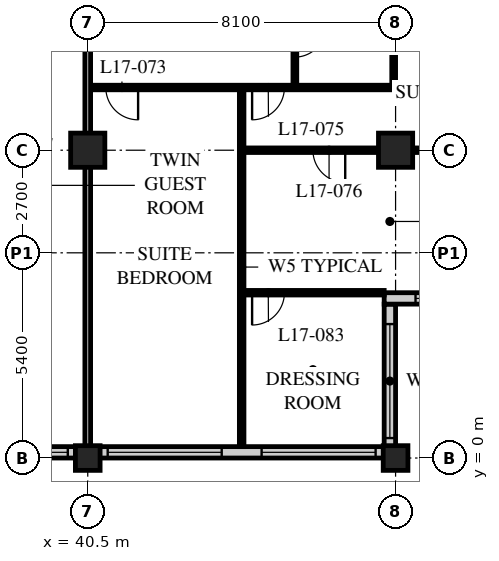
"""IFC4 building model, lengths in metres.
Left out: names, types, materials, properties, quantities, classifications, styles, units other than length and angle.
Written with IfcOpenShell. Run it as: python <this file> out.ifc"""

import sys

from ifc_helpers import new_model, si_unit, direction, frame, frame_2d, origin, origin_2d, place, context, subcontext, project, spatial, rectangle, hollow_rectangle, extrude, element, fill, save


model = new_model("IFC4")
c1 = context("Model", 3, precision=1e-05, world=origin(), true_north=direction((0.0, 1.0)))
c2 = subcontext(c1, "Body", "Model", "MODEL_VIEW")
j1 = project(units=[si_unit("LENGTHUNIT", "METRE"), si_unit("PLANEANGLEUNIT", "RADIAN")], contexts=[c1])
p1 = place(None, origin())
s1 = spatial("IfcSite", under=j1, at=p1, CompositionType="ELEMENT")
p2 = place(p1, origin())
s2 = spatial("IfcBuilding", under=s1, at=p2, CompositionType="ELEMENT")
p3 = place(p2, frame((0.0, 0.0, 70.4)))
s3 = spatial("IfcBuildingStorey", under=s2, at=p3, CompositionType="ELEMENT", Elevation=70.4)
p4 = place(p3, frame((40.5, 0.0, 0.0), z_axis=(0.0, 0.0, 1.0), x_axis=(1.0, 0.0, 0.0)))
e1 = element("IfcColumn", 1, at=p4, inside=s3, PredefinedType="COLUMN", context=c2, shape_type="SweptSolid", body=[
    extrude(hollow_rectangle(XDim=0.65, YDim=0.65, WallThickness=0.05, at=origin_2d()), origin(), (0.0, 0.0, 1.0), 3.4),
])
p5 = place(p3, frame((40.5, 8.1, 0.0), z_axis=(0.0, 0.0, 1.0), x_axis=(1.0, 0.0, 0.0)))
e2 = element("IfcColumn", 2, at=p5, inside=s3, PredefinedType="COLUMN", context=c2, shape_type="SweptSolid", body=[
    extrude(hollow_rectangle(XDim=0.9, YDim=0.9, WallThickness=0.09, at=origin_2d()), origin(), (0.0, 0.0, 1.0), 3.4),
])
p6 = place(p3, frame((48.6, 0.0, 0.0), z_axis=(0.0, 0.0, 1.0), x_axis=(1.0, 0.0, 0.0)))
e3 = element("IfcColumn", 3, at=p6, inside=s3, PredefinedType="COLUMN", context=c2, shape_type="SweptSolid", body=[
    extrude(hollow_rectangle(XDim=0.65, YDim=0.65, WallThickness=0.05, at=origin_2d()), origin(), (0.0, 0.0, 1.0), 3.4),
])
p7 = place(p3, frame((48.6, 8.1, 0.0), z_axis=(0.0, 0.0, 1.0), x_axis=(1.0, 0.0, 0.0)))
e4 = element("IfcColumn", 4, at=p7, inside=s3, PredefinedType="COLUMN", context=c2, shape_type="SweptSolid", body=[
    extrude(hollow_rectangle(XDim=0.9, YDim=0.9, WallThickness=0.09, at=origin_2d()), origin(), (0.0, 0.0, 1.0), 3.4),
])
p8 = place(p3, frame((8.4, 0.15, 0.0), z_axis=(0.0, 0.0, 1.0), x_axis=(1.0, 0.0, 0.0)))
e5 = element("IfcWall", 5, at=p8, inside=s3, PredefinedType="SOLIDWALL", context=c2, shape_type="SweptSolid", body=[
    extrude(rectangle(XDim=40.2, YDim=0.3, at=frame_2d((20.1, 0.0))), origin(), (0.0, 0.0, 1.0), 3.19),
])
p9 = place(p8, frame((0.225, 0.0, 0.9)))
e6 = element("IfcOpeningElement", 6, at=p9, cuts=e5, PredefinedType="OPENING", context=c2, shape_type="SweptSolid", body=[
    extrude(rectangle(XDim=3.0, YDim=2.0, at=frame_2d((1.5, 1.0))), frame((0.0, 0.16, 0.0), z_axis=(0.0, -1.0, 0.0), x_axis=(1.0, 0.0, 0.0)), (0.0, 0.0, 1.0), 0.32),
])
p10 = place(p8, frame((4.275, 0.0, 0.9)))
e7 = element("IfcOpeningElement", 7, at=p10, cuts=e5, PredefinedType="OPENING", context=c2, shape_type="SweptSolid", body=[
    extrude(rectangle(XDim=3.0, YDim=2.0, at=frame_2d((1.5, 1.0))), frame((0.0, 0.16, 0.0), z_axis=(0.0, -1.0, 0.0), x_axis=(1.0, 0.0, 0.0)), (0.0, 0.0, 1.0), 0.32),
])
p11 = place(p8, frame((8.325, 0.0, 0.9)))
e8 = element("IfcOpeningElement", 8, at=p11, cuts=e5, PredefinedType="OPENING", context=c2, shape_type="SweptSolid", body=[
    extrude(rectangle(XDim=3.0, YDim=2.0, at=frame_2d((1.5, 1.0))), frame((0.0, 0.16, 0.0), z_axis=(0.0, -1.0, 0.0), x_axis=(1.0, 0.0, 0.0)), (0.0, 0.0, 1.0), 0.32),
])
p12 = place(p8, frame((12.375, 0.0, 0.9)))
e9 = element("IfcOpeningElement", 9, at=p12, cuts=e5, PredefinedType="OPENING", context=c2, shape_type="SweptSolid", body=[
    extrude(rectangle(XDim=3.0, YDim=2.0, at=frame_2d((1.5, 1.0))), frame((0.0, 0.16, 0.0), z_axis=(0.0, -1.0, 0.0), x_axis=(1.0, 0.0, 0.0)), (0.0, 0.0, 1.0), 0.32),
])
p13 = place(p8, frame((16.425, 0.0, 0.9)))
e10 = element("IfcOpeningElement", 10, at=p13, cuts=e5, PredefinedType="OPENING", context=c2, shape_type="SweptSolid", body=[
    extrude(rectangle(XDim=3.0, YDim=2.0, at=frame_2d((1.5, 1.0))), frame((0.0, 0.16, 0.0), z_axis=(0.0, -1.0, 0.0), x_axis=(1.0, 0.0, 0.0)), (0.0, 0.0, 1.0), 0.32),
])
p14 = place(p8, frame((20.475, 0.0, 0.9)))
e11 = element("IfcOpeningElement", 11, at=p14, cuts=e5, PredefinedType="OPENING", context=c2, shape_type="SweptSolid", body=[
    extrude(rectangle(XDim=3.0, YDim=2.0, at=frame_2d((1.5, 1.0))), frame((0.0, 0.16, 0.0), z_axis=(0.0, -1.0, 0.0), x_axis=(1.0, 0.0, 0.0)), (0.0, 0.0, 1.0), 0.32),
])
p15 = place(p8, frame((24.525, 0.0, 0.9)))
e12 = element("IfcOpeningElement", 12, at=p15, cuts=e5, PredefinedType="OPENING", context=c2, shape_type="SweptSolid", body=[
    extrude(rectangle(XDim=3.0, YDim=2.0, at=frame_2d((1.5, 1.0))), frame((0.0, 0.16, 0.0), z_axis=(0.0, -1.0, 0.0), x_axis=(1.0, 0.0, 0.0)), (0.0, 0.0, 1.0), 0.32),
])
p16 = place(p8, frame((28.575, 0.0, 0.9)))
e13 = element("IfcOpeningElement", 13, at=p16, cuts=e5, PredefinedType="OPENING", context=c2, shape_type="SweptSolid", body=[
    extrude(rectangle(XDim=3.0, YDim=2.0, at=frame_2d((1.5, 1.0))), frame((0.0, 0.16, 0.0), z_axis=(0.0, -1.0, 0.0), x_axis=(1.0, 0.0, 0.0)), (0.0, 0.0, 1.0), 0.32),
])
p17 = place(p8, frame((32.625, 0.0, 0.9)))
e14 = element("IfcOpeningElement", 14, at=p17, cuts=e5, PredefinedType="OPENING", context=c2, shape_type="SweptSolid", body=[
    extrude(rectangle(XDim=3.0, YDim=2.0, at=frame_2d((1.5, 1.0))), frame((0.0, 0.16, 0.0), z_axis=(0.0, -1.0, 0.0), x_axis=(1.0, 0.0, 0.0)), (0.0, 0.0, 1.0), 0.32),
])
p18 = place(p8, frame((36.675, 0.0, 0.9)))
e15 = element("IfcOpeningElement", 15, at=p18, cuts=e5, PredefinedType="OPENING", context=c2, shape_type="SweptSolid", body=[
    extrude(rectangle(XDim=3.0, YDim=2.0, at=frame_2d((1.5, 1.0))), frame((0.0, 0.16, 0.0), z_axis=(0.0, -1.0, 0.0), x_axis=(1.0, 0.0, 0.0)), (0.0, 0.0, 1.0), 0.32),
])
p19 = place(p3, frame((48.45, 0.3, 0.0), z_axis=(0.0, 0.0, 1.0), x_axis=(0.0, 1.0, 0.0)))
e16 = element("IfcWall", 16, at=p19, inside=s3, PredefinedType="SOLIDWALL", context=c2, shape_type="SweptSolid", body=[
    extrude(rectangle(XDim=3.75, YDim=0.3, at=frame_2d((1.875, 0.0))), origin(), (0.0, 0.0, 1.0), 3.19),
])
p20 = place(p19, frame((0.225, 0.0, 0.9)))
e17 = element("IfcOpeningElement", 17, at=p20, cuts=e16, PredefinedType="OPENING", context=c2, shape_type="SweptSolid", body=[
    extrude(rectangle(XDim=3.0, YDim=1.5, at=frame_2d((1.5, 0.75))), frame((0.0, 0.16, 0.0), z_axis=(0.0, -1.0, 0.0), x_axis=(1.0, 0.0, 0.0)), (0.0, 0.0, 1.0), 0.32),
])
p21 = place(p3, frame((48.3, 4.2, 0.0), z_axis=(0.0, 0.0, 1.0), x_axis=(1.0, 0.0, 0.0)))
e18 = element("IfcWall", 18, at=p21, inside=s3, PredefinedType="SOLIDWALL", context=c2, shape_type="SweptSolid", body=[
    extrude(rectangle(XDim=4.35, YDim=0.3, at=frame_2d((2.175, 0.0))), origin(), (0.0, 0.0, 1.0), 3.19),
])
p22 = place(p21, frame((0.825, 0.0, 0.9)))
e19 = element("IfcOpeningElement", 19, at=p22, cuts=e18, PredefinedType="OPENING", context=c2, shape_type="SweptSolid", body=[
    extrude(rectangle(XDim=3.0, YDim=1.5, at=frame_2d((1.5, 0.75))), frame((0.0, 0.16, 0.0), z_axis=(0.0, -1.0, 0.0), x_axis=(1.0, 0.0, 0.0)), (0.0, 0.0, 1.0), 0.32),
])
p23 = place(p3, frame((40.5, 9.75, 0.0), z_axis=(0.0, 0.0, 1.0), x_axis=(1.0, 0.0, 0.0)))
e20 = element("IfcWall", 20, at=p23, inside=s3, PredefinedType="PARTITIONING", context=c2, shape_type="SweptSolid", body=[
    extrude(rectangle(XDim=8.05, YDim=0.12, at=frame_2d((4.025, 0.0))), origin(), (0.0, 0.0, 1.0), 3.19),
])
p24 = place(p23, frame((0.475, 0.0, 0.0)))
e21 = element("IfcOpeningElement", 21, at=p24, cuts=e20, PredefinedType="OPENING", context=c2, shape_type="SweptSolid", body=[
    extrude(rectangle(XDim=0.85, YDim=2.1, at=frame_2d((0.425, 1.05))), frame((0.0, 0.07, 0.0), z_axis=(0.0, -1.0, 0.0), x_axis=(1.0, 0.0, 0.0)), (0.0, 0.0, 1.0), 0.14),
])
p25 = place(p23, frame((4.325, 0.0, 0.0)))
e22 = element("IfcOpeningElement", 22, at=p25, cuts=e20, PredefinedType="OPENING", context=c2, shape_type="SweptSolid", body=[
    extrude(rectangle(XDim=0.85, YDim=2.1, at=frame_2d((0.425, 1.05))), frame((0.0, 0.07, 0.0), z_axis=(0.0, -1.0, 0.0), x_axis=(1.0, 0.0, 0.0)), (0.0, 0.0, 1.0), 0.14),
])
p26 = place(p3, frame((45.95, 12.15, 0.0), z_axis=(0.0, 0.0, 1.0), x_axis=(0.0, -1.0, 0.0)))
e23 = element("IfcWall", 23, at=p26, inside=s3, PredefinedType="PARTITIONING", context=c2, shape_type="SweptSolid", body=[
    extrude(rectangle(XDim=2.4, YDim=0.1, at=frame_2d((1.2, 0.0))), origin(), (0.0, 0.0, 1.0), 3.19),
])
p27 = place(p26, frame((0.8, 0.0, 0.0)))
e24 = element("IfcOpeningElement", 24, at=p27, cuts=e23, PredefinedType="OPENING", context=c2, shape_type="SweptSolid", body=[
    extrude(rectangle(XDim=0.8, YDim=2.1, at=frame_2d((0.4, 1.05))), frame((0.0, 0.06, 0.0), z_axis=(0.0, -1.0, 0.0), x_axis=(1.0, 0.0, 0.0)), (0.0, 0.0, 1.0), 0.12),
])
p28 = place(p3, frame((48.55, 12.15, 0.0), z_axis=(0.0, 0.0, 1.0), x_axis=(0.0, -1.0, 0.0)))
e25 = element("IfcWall", 25, at=p28, inside=s3, PredefinedType="PARTITIONING", context=c2, shape_type="SweptSolid", body=[
    extrude(rectangle(XDim=2.4, YDim=0.1, at=frame_2d((1.2, 0.0))), origin(), (0.0, 0.0, 1.0), 2.578),
])
p29 = place(p3, frame((44.55, 9.75, 0.0), z_axis=(0.0, 0.0, 1.0), x_axis=(0.0, -1.0, 0.0)))
e26 = element("IfcWall", 26, at=p29, inside=s3, PredefinedType="PARTITIONING", context=c2, shape_type="SweptSolid", body=[
    extrude(rectangle(XDim=9.45, YDim=0.12, at=frame_2d((4.725, 0.0))), origin(), (0.0, 0.0, 1.0), 3.19),
])
p30 = place(p3, frame((44.55, 8.1, 0.0), z_axis=(0.0, 0.0, 1.0), x_axis=(1.0, 0.0, 0.0)))
e27 = element("IfcWall", 27, at=p30, inside=s3, PredefinedType="PARTITIONING", context=c2, shape_type="SweptSolid", body=[
    extrude(rectangle(XDim=7.8, YDim=0.12, at=frame_2d((3.9, 0.0))), origin(), (0.0, 0.0, 1.0), 2.578),
])
p31 = place(p30, frame((1.875, 0.0, 0.0)))
e28 = element("IfcOpeningElement", 28, at=p31, cuts=e27, PredefinedType="OPENING", context=c2, shape_type="SweptSolid", body=[
    extrude(rectangle(XDim=0.85, YDim=2.1, at=frame_2d((0.425, 1.05))), frame((0.0, 0.07, 0.0), z_axis=(0.0, -1.0, 0.0), x_axis=(1.0, 0.0, 0.0)), (0.0, 0.0, 1.0), 0.14),
])
p32 = place(p3, frame((40.5, 12.15, 0.0), z_axis=(0.0, 0.0, 1.0), x_axis=(0.0, -1.0, 0.0)))
e29 = element("IfcWall", 29, at=p32, inside=s3, PredefinedType="PARTITIONING", context=c2, shape_type="SweptSolid", body=[
    extrude(rectangle(XDim=11.85, YDim=0.15, at=frame_2d((5.925, 0.0))), origin(), (0.0, 0.0, 1.0), 2.578),
])
p33 = place(p3, frame((44.55, 4.35, 0.0), z_axis=(0.0, 0.0, 1.0), x_axis=(1.0, 0.0, 0.0)))
e30 = element("IfcWall", 30, at=p33, inside=s3, PredefinedType="PARTITIONING", context=c2, shape_type="SweptSolid", body=[
    extrude(rectangle(XDim=3.75, YDim=0.12, at=frame_2d((1.875, 0.0))), origin(), (0.0, 0.0, 1.0), 3.19),
])
p34 = place(p33, frame((0.275, 0.0, 0.0)))
e31 = element("IfcOpeningElement", 31, at=p34, cuts=e30, PredefinedType="OPENING", context=c2, shape_type="SweptSolid", body=[
    extrude(rectangle(XDim=0.85, YDim=2.1, at=frame_2d((0.425, 1.05))), frame((0.0, 0.07, 0.0), z_axis=(0.0, -1.0, 0.0), x_axis=(1.0, 0.0, 0.0)), (0.0, 0.0, 1.0), 0.14),
])
p35 = place(p16, origin())
e32 = element("IfcWindow", 32, at=p35, inside=s3, PartitioningType="SINGLE_PANEL", PredefinedType="WINDOW", context=c2, shape_type="SweptSolid", body=[
    extrude(rectangle(XDim=3.0, YDim=2.0, at=frame_2d((1.5, 1.0))), frame((0.0, 0.03, 0.0), z_axis=(0.0, -1.0, 0.0), x_axis=(1.0, 0.0, 0.0)), (0.0, 0.0, 1.0), 0.06),
])
fill(e13, e32)
p36 = place(p17, origin())
e33 = element("IfcWindow", 33, at=p36, inside=s3, PartitioningType="SINGLE_PANEL", PredefinedType="WINDOW", context=c2, shape_type="SweptSolid", body=[
    extrude(rectangle(XDim=3.0, YDim=2.0, at=frame_2d((1.5, 1.0))), frame((0.0, 0.03, 0.0), z_axis=(0.0, -1.0, 0.0), x_axis=(1.0, 0.0, 0.0)), (0.0, 0.0, 1.0), 0.06),
])
fill(e14, e33)
p37 = place(p18, origin())
e34 = element("IfcWindow", 34, at=p37, inside=s3, PartitioningType="SINGLE_PANEL", PredefinedType="WINDOW", context=c2, shape_type="SweptSolid", body=[
    extrude(rectangle(XDim=3.0, YDim=2.0, at=frame_2d((1.5, 1.0))), frame((0.0, 0.03, 0.0), z_axis=(0.0, -1.0, 0.0), x_axis=(1.0, 0.0, 0.0)), (0.0, 0.0, 1.0), 0.06),
])
fill(e15, e34)
p38 = place(p20, origin())
e35 = element("IfcWindow", 35, at=p38, inside=s3, PartitioningType="SINGLE_PANEL", PredefinedType="WINDOW", context=c2, shape_type="SweptSolid", body=[
    extrude(rectangle(XDim=3.0, YDim=1.5, at=frame_2d((1.5, 0.75))), frame((0.0, 0.03, 0.0), z_axis=(0.0, -1.0, 0.0), x_axis=(1.0, 0.0, 0.0)), (0.0, 0.0, 1.0), 0.06),
])
fill(e17, e35)
p39 = place(p22, origin())
e36 = element("IfcWindow", 36, at=p39, inside=s3, PartitioningType="SINGLE_PANEL", PredefinedType="WINDOW", context=c2, shape_type="SweptSolid", body=[
    extrude(rectangle(XDim=3.0, YDim=1.5, at=frame_2d((1.5, 0.75))), frame((0.0, 0.03, 0.0), z_axis=(0.0, -1.0, 0.0), x_axis=(1.0, 0.0, 0.0)), (0.0, 0.0, 1.0), 0.06),
])
fill(e19, e36)
p40 = place(p24, origin())
e37 = element("IfcDoor", 37, at=p40, inside=s3, OperationType="SINGLE_SWING_LEFT", PredefinedType="DOOR", context=c2, shape_type="SweptSolid", body=[
    extrude(rectangle(XDim=0.85, YDim=2.1, at=frame_2d((0.425, 1.05))), frame((0.0, 0.025, 0.0), z_axis=(0.0, -1.0, 0.0), x_axis=(1.0, 0.0, 0.0)), (0.0, 0.0, 1.0), 0.05),
])
fill(e21, e37)
p41 = place(p27, origin())
e38 = element("IfcDoor", 38, at=p41, inside=s3, OperationType="SINGLE_SWING_LEFT", PredefinedType="DOOR", context=c2, shape_type="SweptSolid", body=[
    extrude(rectangle(XDim=0.8, YDim=2.1, at=frame_2d((0.4, 1.05))), frame((0.0, 0.025, 0.0), z_axis=(0.0, -1.0, 0.0), x_axis=(1.0, 0.0, 0.0)), (0.0, 0.0, 1.0), 0.05),
])
fill(e24, e38)
p42 = place(p25, origin())
e39 = element("IfcDoor", 39, at=p42, inside=s3, OperationType="SINGLE_SWING_RIGHT", PredefinedType="DOOR", context=c2, shape_type="SweptSolid", body=[
    extrude(rectangle(XDim=0.85, YDim=2.1, at=frame_2d((0.425, 1.05))), frame((0.0, 0.025, 0.0), z_axis=(0.0, -1.0, 0.0), x_axis=(1.0, 0.0, 0.0)), (0.0, 0.0, 1.0), 0.05),
])
fill(e22, e39)
p43 = place(p31, origin())
e40 = element("IfcDoor", 40, at=p43, inside=s3, OperationType="SINGLE_SWING_LEFT", PredefinedType="DOOR", context=c2, shape_type="SweptSolid", body=[
    extrude(rectangle(XDim=0.85, YDim=2.1, at=frame_2d((0.425, 1.05))), frame((0.0, 0.025, 0.0), z_axis=(0.0, -1.0, 0.0), x_axis=(1.0, 0.0, 0.0)), (0.0, 0.0, 1.0), 0.05),
])
fill(e28, e40)
p44 = place(p34, origin())
e41 = element("IfcDoor", 41, at=p44, inside=s3, OperationType="SINGLE_SWING_RIGHT", PredefinedType="DOOR", context=c2, shape_type="SweptSolid", body=[
    extrude(rectangle(XDim=0.85, YDim=2.1, at=frame_2d((0.425, 1.05))), frame((0.0, 0.025, 0.0), z_axis=(0.0, -1.0, 0.0), x_axis=(1.0, 0.0, 0.0)), (0.0, 0.0, 1.0), 0.05),
])
fill(e31, e41)
save(model, sys.argv[1])
